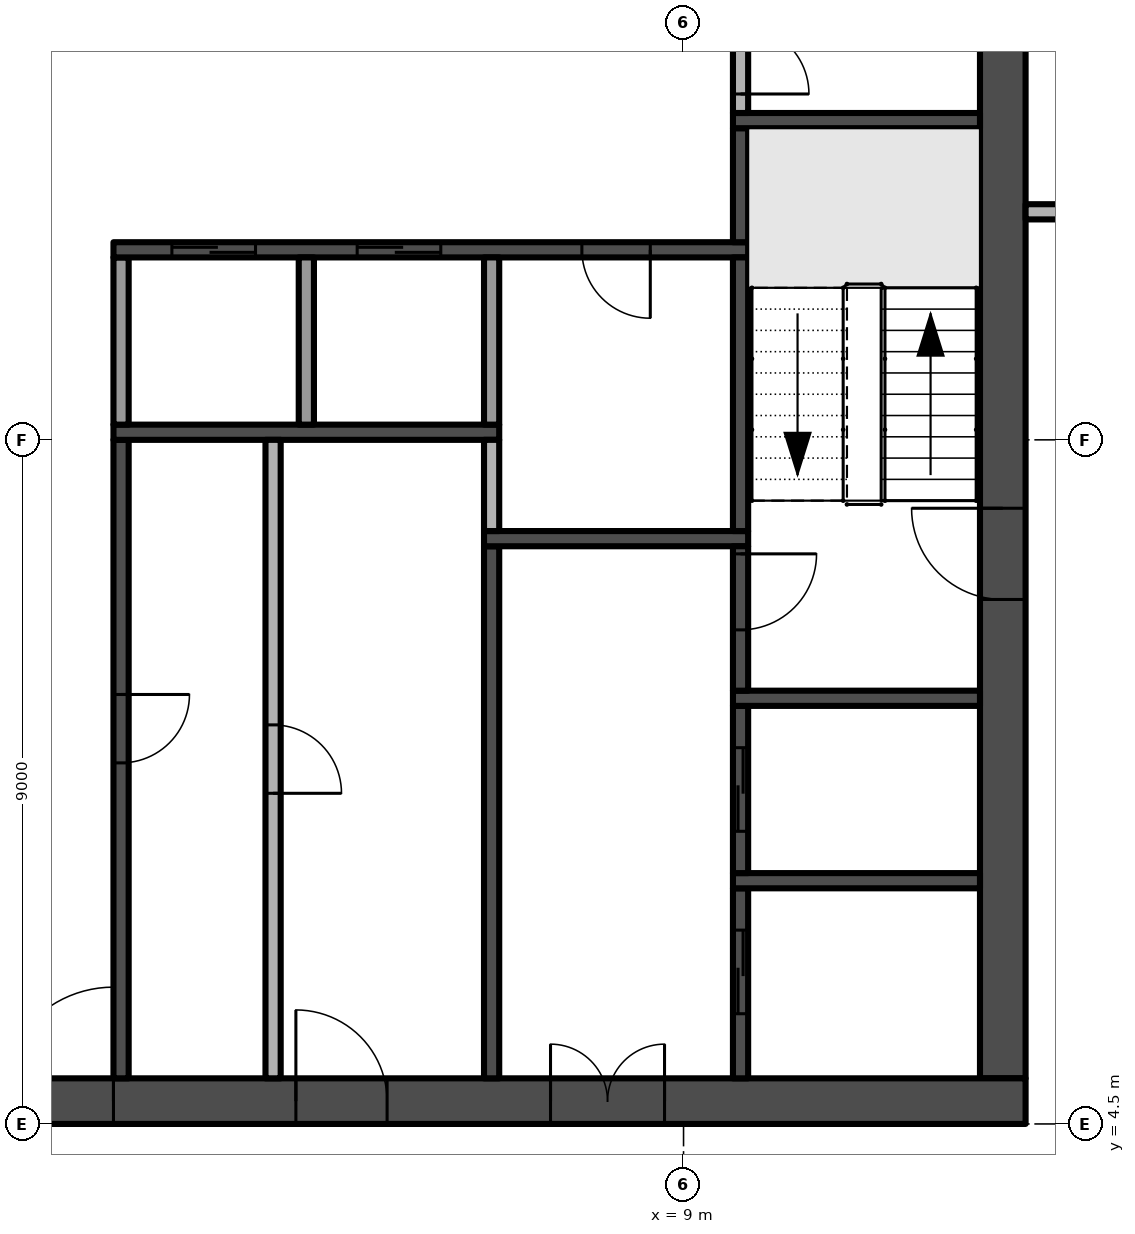
"""IFC4 building model, lengths in metres.
Left out: names, types, materials, properties, quantities, classifications, styles, units other than length and angle.
Written with IfcOpenShell. Run it as: python <this file> out.ifc"""

import sys

from ifc_helpers import new_model, si_unit, direction, frame, frame_2d, origin, place, context, subcontext, project, spatial, rectangle, extrude, element, fill, save


model = new_model("IFC4")
c1 = context("Model", 3, precision=1e-05, world=origin(), true_north=direction((0.0, 1.0)))
c2 = subcontext(c1, "Body", "Model", "MODEL_VIEW")
j1 = project(units=[si_unit("LENGTHUNIT", "METRE"), si_unit("PLANEANGLEUNIT", "RADIAN")], contexts=[c1])
p1 = place(None, origin())
s1 = spatial("IfcSite", under=j1, at=p1, CompositionType="ELEMENT")
p2 = place(p1, origin())
s2 = spatial("IfcBuilding", under=s1, at=p2, CompositionType="ELEMENT")
p3 = place(p2, frame((0.0, 0.0, 265.4)))
s3 = spatial("IfcBuildingStorey", under=s2, at=p3, CompositionType="ELEMENT", Elevation=265.4)
p4 = place(p3, frame((-13.5, 4.8, -0.3), z_axis=(0.0, 0.0, 1.0), x_axis=(1.0, 0.0, 0.0)))
e1 = element("IfcWall", 1, at=p4, inside=s3, PredefinedType="SHEAR", context=c2, shape_type="SweptSolid", body=[
    extrude(rectangle(XDim=27.0, YDim=0.6, at=frame_2d((13.5, 0.0))), origin(), (0.0, 0.0, 1.0), 3.8),
])
p5 = place(p4, frame((12.0, 0.0, 0.3)))
e2 = element("IfcOpeningElement", 2, at=p5, cuts=e1, PredefinedType="OPENING", context=c2, shape_type="SweptSolid", body=[
    extrude(rectangle(XDim=3.0, YDim=2.4, at=frame_2d((1.5, 1.2))), frame((0.0, 0.31, 0.0), z_axis=(0.0, -1.0, 0.0), x_axis=(1.0, 0.0, 0.0)), (0.0, 0.0, 1.0), 0.62),
])
p6 = place(p4, frame((4.9, 0.0, 0.3)))
e3 = element("IfcOpeningElement", 3, at=p6, cuts=e1, PredefinedType="OPENING", context=c2, shape_type="SweptSolid", body=[
    extrude(rectangle(XDim=1.2, YDim=2.2, at=frame_2d((0.6, 1.1))), frame((0.0, 0.31, 0.0), z_axis=(0.0, -1.0, 0.0), x_axis=(1.0, 0.0, 0.0)), (0.0, 0.0, 1.0), 0.62),
])
p7 = place(p4, frame((20.75, 0.0, 0.3)))
e4 = element("IfcOpeningElement", 4, at=p7, cuts=e1, PredefinedType="OPENING", context=c2, shape_type="SweptSolid", body=[
    extrude(rectangle(XDim=1.5, YDim=2.2, at=frame_2d((0.75, 1.1))), frame((0.0, 0.31, 0.0), z_axis=(0.0, -1.0, 0.0), x_axis=(1.0, 0.0, 0.0)), (0.0, 0.0, 1.0), 0.62),
])
p8 = place(p4, frame((17.4, 0.0, 0.3)))
e5 = element("IfcOpeningElement", 5, at=p8, cuts=e1, PredefinedType="OPENING", context=c2, shape_type="SweptSolid", body=[
    extrude(rectangle(XDim=1.2, YDim=2.2, at=frame_2d((0.6, 1.1))), frame((0.0, 0.31, 0.0), z_axis=(0.0, -1.0, 0.0), x_axis=(1.0, 0.0, 0.0)), (0.0, 0.0, 1.0), 0.62),
])
p9 = place(p3, frame((13.2, 5.1, -0.3), z_axis=(0.0, 0.0, 1.0), x_axis=(0.0, 1.0, 0.0)))
e6 = element("IfcWall", 6, at=p9, inside=s3, PredefinedType="SHEAR", context=c2, shape_type="SweptSolid", body=[
    extrude(rectangle(XDim=16.8, YDim=0.6, at=frame_2d((8.4, 0.0))), origin(), (0.0, 0.0, 1.0), 3.8),
])
p10 = place(p9, frame((6.3, 0.0, 0.3)))
e7 = element("IfcOpeningElement", 7, at=p10, cuts=e6, PredefinedType="OPENING", context=c2, shape_type="SweptSolid", body=[
    extrude(rectangle(XDim=1.2, YDim=2.2, at=frame_2d((0.6, 1.1))), frame((0.0, 0.31, 0.0), z_axis=(0.0, -1.0, 0.0), x_axis=(1.0, 0.0, 0.0)), (0.0, 0.0, 1.0), 0.62),
])
p11 = place(p3, frame((1.6, 13.5, 0.0), z_axis=(0.0, 0.0, 1.0), x_axis=(0.0, -1.0, 0.0)))
e8 = element("IfcWall", 8, at=p11, inside=s3, PredefinedType="SHEAR", context=c2, shape_type="SweptSolid", body=[
    extrude(rectangle(XDim=8.4, YDim=0.2, at=frame_2d((4.2, 0.0))), origin(), (0.0, 0.0, 1.0), 3.5),
])
p12 = place(p11, frame((3.35, 0.0, 0.0)))
e9 = element("IfcOpeningElement", 9, at=p12, cuts=e8, PredefinedType="OPENING", context=c2, shape_type="SweptSolid", body=[
    extrude(rectangle(XDim=0.9, YDim=2.1, at=frame_2d((0.45, 1.05))), frame((0.0, 0.11, 0.0), z_axis=(0.0, -1.0, 0.0), x_axis=(1.0, 0.0, 0.0)), (0.0, 0.0, 1.0), 0.22),
])
p13 = place(p3, frame((1.5, 13.6, 0.0), z_axis=(0.0, 0.0, 1.0), x_axis=(1.0, 0.0, 0.0)))
e10 = element("IfcWall", 10, at=p13, inside=s3, PredefinedType="SHEAR", context=c2, shape_type="SweptSolid", body=[
    extrude(rectangle(XDim=5.075, YDim=0.2, at=frame_2d((2.538, 0.0))), origin(), (0.0, 0.0, 1.0), 3.5),
])
p14 = place(p3, frame((1.6, 13.7, 0.0), z_axis=(0.0, 0.0, 1.0), x_axis=(0.0, 1.0, 0.0)))
e11 = element("IfcWall", 11, at=p14, inside=s3, PredefinedType="PARTITIONING", context=c2, shape_type="SweptSolid", body=[
    extrude(rectangle(XDim=2.2, YDim=0.2, at=frame_2d((1.1, 0.0))), origin(), (0.0, 0.0, 1.0), 3.5),
])
p15 = place(p3, frame((9.85, 16.0, 0.0), z_axis=(0.0, 0.0, 1.0), x_axis=(-1.0, 0.0, 0.0)))
e12 = element("IfcWall", 12, at=p15, inside=s3, PredefinedType="SHEAR", context=c2, shape_type="SweptSolid", body=[
    extrude(rectangle(XDim=8.35, YDim=0.2, at=frame_2d((4.175, 0.0))), origin(), (0.0, 0.0, 1.0), 3.5),
])
p16 = place(p15, frame((6.481, 0.0, 0.0)))
e13 = element("IfcOpeningElement", 13, at=p16, cuts=e12, PredefinedType="OPENING", context=c2, shape_type="SweptSolid", body=[
    extrude(rectangle(XDim=1.1, YDim=2.1, at=frame_2d((0.55, 1.05))), frame((0.0, 0.11, 0.0), z_axis=(0.0, -1.0, 0.0), x_axis=(1.0, 0.0, 0.0)), (0.0, 0.0, 1.0), 0.22),
])
p17 = place(p15, frame((4.044, 0.0, 0.0)))
e14 = element("IfcOpeningElement", 14, at=p17, cuts=e12, PredefinedType="OPENING", context=c2, shape_type="SweptSolid", body=[
    extrude(rectangle(XDim=1.1, YDim=2.1, at=frame_2d((0.55, 1.05))), frame((0.0, 0.11, 0.0), z_axis=(0.0, -1.0, 0.0), x_axis=(1.0, 0.0, 0.0)), (0.0, 0.0, 1.0), 0.22),
])
p18 = place(p15, frame((1.288, 0.0, 0.0)))
e15 = element("IfcOpeningElement", 15, at=p18, cuts=e12, PredefinedType="OPENING", context=c2, shape_type="SweptSolid", body=[
    extrude(rectangle(XDim=0.9, YDim=2.1, at=frame_2d((0.45, 1.05))), frame((0.0, 0.11, 0.0), z_axis=(0.0, -1.0, 0.0), x_axis=(1.0, 0.0, 0.0)), (0.0, 0.0, 1.0), 0.22),
])
p19 = place(p3, frame((3.6, 13.5, 0.0), z_axis=(0.0, 0.0, 1.0), x_axis=(0.0, -1.0, 0.0)))
e16 = element("IfcWall", 16, at=p19, inside=s3, PredefinedType="PARTITIONING", context=c2, shape_type="SweptSolid", body=[
    extrude(rectangle(XDim=8.4, YDim=0.2, at=frame_2d((4.2, 0.0))), origin(), (0.0, 0.0, 1.0), 3.5),
])
p20 = place(p19, frame((3.75, 0.0, 0.0)))
e17 = element("IfcOpeningElement", 17, at=p20, cuts=e16, PredefinedType="OPENING", context=c2, shape_type="SweptSolid", body=[
    extrude(rectangle(XDim=0.9, YDim=2.1, at=frame_2d((0.45, 1.05))), frame((0.0, 0.11, 0.0), z_axis=(0.0, -1.0, 0.0), x_axis=(1.0, 0.0, 0.0)), (0.0, 0.0, 1.0), 0.22),
])
p21 = place(p3, frame((4.037, 13.7, 0.0), z_axis=(0.0, 0.0, 1.0), x_axis=(0.0, 1.0, 0.0)))
e18 = element("IfcWall", 18, at=p21, inside=s3, PredefinedType="PARTITIONING", context=c2, shape_type="SweptSolid", body=[
    extrude(rectangle(XDim=2.2, YDim=0.2, at=frame_2d((1.1, 0.0))), origin(), (0.0, 0.0, 1.0), 3.5),
])
p22 = place(p3, frame((6.475, 5.1, 0.0), z_axis=(0.0, 0.0, 1.0), x_axis=(0.0, 1.0, 0.0)))
e19 = element("IfcWall", 19, at=p22, inside=s3, PredefinedType="SHEAR", context=c2, shape_type="SweptSolid", body=[
    extrude(rectangle(XDim=7.0, YDim=0.2, at=frame_2d((3.5, 0.0))), origin(), (0.0, 0.0, 1.0), 3.5),
])
p23 = place(p3, frame((6.375, 12.2, 0.0), z_axis=(0.0, 0.0, 1.0), x_axis=(1.0, 0.0, 0.0)))
e20 = element("IfcWall", 20, at=p23, inside=s3, PredefinedType="SHEAR", context=c2, shape_type="SweptSolid", body=[
    extrude(rectangle(XDim=3.475, YDim=0.2, at=frame_2d((1.738, 0.0))), origin(), (0.0, 0.0, 1.0), 3.5),
])
p24 = place(p3, frame((6.475, 12.3, 0.0), z_axis=(0.0, 0.0, 1.0), x_axis=(0.0, 1.0, 0.0)))
e21 = element("IfcWall", 21, at=p24, inside=s3, PredefinedType="PARTITIONING", context=c2, shape_type="SweptSolid", body=[
    extrude(rectangle(XDim=1.2, YDim=0.2, at=frame_2d((0.6, 0.0))), origin(), (0.0, 0.0, 1.0), 3.5),
])
p25 = place(p3, frame((6.475, 13.7, 0.0), z_axis=(0.0, 0.0, 1.0), x_axis=(0.0, 1.0, 0.0)))
e22 = element("IfcWall", 22, at=p25, inside=s3, PredefinedType="PARTITIONING", context=c2, shape_type="SweptSolid", body=[
    extrude(rectangle(XDim=2.2, YDim=0.2, at=frame_2d((1.1, 0.0))), origin(), (0.0, 0.0, 1.0), 3.5),
])
p26 = place(p3, frame((9.75, 5.1, 0.0), z_axis=(0.0, 0.0, 1.0), x_axis=(0.0, 1.0, 0.0)))
e23 = element("IfcWall", 23, at=p26, inside=s3, PredefinedType="SHEAR", context=c2, shape_type="SweptSolid", body=[
    extrude(rectangle(XDim=2.5, YDim=0.2, at=frame_2d((1.25, 0.0))), origin(), (0.0, 0.0, 1.0), 3.5),
])
p27 = place(p26, frame((0.85, 0.0, 0.0)))
e24 = element("IfcOpeningElement", 24, at=p27, cuts=e23, PredefinedType="OPENING", context=c2, shape_type="SweptSolid", body=[
    extrude(rectangle(XDim=1.1, YDim=2.1, at=frame_2d((0.55, 1.05))), frame((0.0, 0.11, 0.0), z_axis=(0.0, -1.0, 0.0), x_axis=(1.0, 0.0, 0.0)), (0.0, 0.0, 1.0), 0.22),
])
p28 = place(p3, frame((9.65, 7.7, 0.0), z_axis=(0.0, 0.0, 1.0), x_axis=(1.0, 0.0, 0.0)))
e25 = element("IfcWall", 25, at=p28, inside=s3, PredefinedType="SHEAR", context=c2, shape_type="SweptSolid", body=[
    extrude(rectangle(XDim=3.25, YDim=0.2, at=frame_2d((1.625, 0.0))), origin(), (0.0, 0.0, 1.0), 3.5),
])
p29 = place(p3, frame((9.75, 7.8, 0.0), z_axis=(0.0, 0.0, 1.0), x_axis=(0.0, 1.0, 0.0)))
e26 = element("IfcWall", 26, at=p29, inside=s3, PredefinedType="SHEAR", context=c2, shape_type="SweptSolid", body=[
    extrude(rectangle(XDim=2.2, YDim=0.2, at=frame_2d((1.1, 0.0))), origin(), (0.0, 0.0, 1.0), 3.5),
])
p30 = place(p29, frame((0.55, 0.0, 0.0)))
e27 = element("IfcOpeningElement", 27, at=p30, cuts=e26, PredefinedType="OPENING", context=c2, shape_type="SweptSolid", body=[
    extrude(rectangle(XDim=1.1, YDim=2.1, at=frame_2d((0.55, 1.05))), frame((0.0, 0.11, 0.0), z_axis=(0.0, -1.0, 0.0), x_axis=(1.0, 0.0, 0.0)), (0.0, 0.0, 1.0), 0.22),
])
p31 = place(p3, frame((9.65, 10.1, 0.0), z_axis=(0.0, 0.0, 1.0), x_axis=(1.0, 0.0, 0.0)))
e28 = element("IfcWall", 28, at=p31, inside=s3, PredefinedType="SHEAR", context=c2, shape_type="SweptSolid", body=[
    extrude(rectangle(XDim=3.25, YDim=0.2, at=frame_2d((1.625, 0.0))), origin(), (0.0, 0.0, 1.0), 3.5),
])
p32 = place(p3, frame((9.75, 12.1, 0.0), z_axis=(0.0, 0.0, 1.0), x_axis=(0.0, -1.0, 0.0)))
e29 = element("IfcWall", 29, at=p32, inside=s3, PredefinedType="SHEAR", context=c2, shape_type="SweptSolid", body=[
    extrude(rectangle(XDim=1.9, YDim=0.2, at=frame_2d((0.95, 0.0))), origin(), (0.0, 0.0, 1.0), 3.5),
])
p33 = place(p32, frame((0.1, 0.0, 0.0)))
e30 = element("IfcOpeningElement", 30, at=p33, cuts=e29, PredefinedType="OPENING", context=c2, shape_type="SweptSolid", body=[
    extrude(rectangle(XDim=1.0, YDim=2.2, at=frame_2d((0.5, 1.1))), frame((0.0, 0.11, 0.0), z_axis=(0.0, -1.0, 0.0), x_axis=(1.0, 0.0, 0.0)), (0.0, 0.0, 1.0), 0.22),
])
p34 = place(p3, frame((9.75, 12.3, 0.0), z_axis=(0.0, 0.0, 1.0), x_axis=(0.0, 1.0, 0.0)))
e31 = element("IfcWall", 31, at=p34, inside=s3, PredefinedType="SHEAR", context=c2, shape_type="SweptSolid", body=[
    extrude(rectangle(XDim=3.6, YDim=0.2, at=frame_2d((1.8, 0.0))), origin(), (0.0, 0.0, 1.0), 3.5),
])
p35 = place(p3, frame((9.75, 16.1, 0.0), z_axis=(0.0, 0.0, 1.0), x_axis=(0.0, 1.0, 0.0)))
e32 = element("IfcWall", 32, at=p35, inside=s3, PredefinedType="SHEAR", context=c2, shape_type="SweptSolid", body=[
    extrude(rectangle(XDim=1.5, YDim=0.2, at=frame_2d((0.75, 0.0))), origin(), (0.0, 0.0, 1.0), 3.5),
])
p36 = place(p3, frame((9.65, 17.7, 0.0), z_axis=(0.0, 0.0, 1.0), x_axis=(1.0, 0.0, 0.0)))
e33 = element("IfcWall", 33, at=p36, inside=s3, PredefinedType="SHEAR", context=c2, shape_type="SweptSolid", body=[
    extrude(rectangle(XDim=3.25, YDim=0.2, at=frame_2d((1.625, 0.0))), origin(), (0.0, 0.0, 1.0), 3.5),
])
p37 = place(p3, frame((9.75, 19.2, 0.0), z_axis=(0.0, 0.0, 1.0), x_axis=(0.0, -1.0, 0.0)))
e34 = element("IfcWall", 34, at=p37, inside=s3, PredefinedType="PARTITIONING", context=c2, shape_type="SweptSolid", body=[
    extrude(rectangle(XDim=1.4, YDim=0.2, at=frame_2d((0.7, 0.0))), origin(), (0.0, 0.0, 1.0), 3.5),
])
p38 = place(p37, frame((0.25, 0.0, 0.0)))
e35 = element("IfcOpeningElement", 35, at=p38, cuts=e34, PredefinedType="OPENING", context=c2, shape_type="SweptSolid", body=[
    extrude(rectangle(XDim=0.9, YDim=2.1, at=frame_2d((0.45, 1.05))), frame((0.0, 0.11, 0.0), z_axis=(0.0, -1.0, 0.0), x_axis=(1.0, 0.0, 0.0)), (0.0, 0.0, 1.0), 0.22),
])
p39 = place(p3, frame((13.5, 16.5, 0.0), z_axis=(0.0, 0.0, 1.0), x_axis=(1.0, 0.0, 0.0)))
e36 = element("IfcWall", 36, at=p39, inside=s3, PredefinedType="PARTITIONING", context=c2, shape_type="SweptSolid", body=[
    extrude(rectangle(XDim=3.825, YDim=0.2, at=frame_2d((1.913, 0.0))), origin(), (0.0, 0.0, 1.0), 3.5),
])
p40 = place(p39, frame((1.55, 0.0, 0.0)))
e37 = element("IfcOpeningElement", 37, at=p40, cuts=e36, PredefinedType="OPENING", context=c2, shape_type="SweptSolid", body=[
    extrude(rectangle(XDim=0.9, YDim=2.1, at=frame_2d((0.45, 1.05))), frame((0.0, 0.11, 0.0), z_axis=(0.0, -1.0, 0.0), x_axis=(1.0, 0.0, 0.0)), (0.0, 0.0, 1.0), 0.22),
])
p41 = place(p5, frame((3.0, 0.0, 0.0), z_axis=(0.0, 0.0, 1.0), x_axis=(-1.0, 0.0, 0.0)))
e38 = element("IfcDoor", 38, at=p41, inside=s3, OperationType="DOUBLE_DOOR_SINGLE_SWING", PredefinedType="DOOR", context=c2, shape_type="SweptSolid", body=[
    extrude(rectangle(XDim=3.0, YDim=2.4, at=frame_2d((1.5, 1.2))), frame((0.0, 0.025, 0.0), z_axis=(0.0, -1.0, 0.0), x_axis=(1.0, 0.0, 0.0)), (0.0, 0.0, 1.0), 0.05),
])
fill(e2, e38)
p42 = place(p10, frame((1.2, 0.0, 0.0), z_axis=(0.0, 0.0, 1.0), x_axis=(-1.0, 0.0, 0.0)))
e39 = element("IfcDoor", 39, at=p42, inside=s3, OperationType="SINGLE_SWING_LEFT", PredefinedType="DOOR", context=c2, shape_type="SweptSolid", body=[
    extrude(rectangle(XDim=1.2, YDim=2.2, at=frame_2d((0.6, 1.1))), frame((0.0, 0.025, 0.0), z_axis=(0.0, -1.0, 0.0), x_axis=(1.0, 0.0, 0.0)), (0.0, 0.0, 1.0), 0.05),
])
fill(e7, e39)
p43 = place(p7, frame((1.5, 0.0, 0.0), z_axis=(0.0, 0.0, 1.0), x_axis=(-1.0, 0.0, 0.0)))
e40 = element("IfcDoor", 40, at=p43, inside=s3, OperationType="DOUBLE_DOOR_SINGLE_SWING", PredefinedType="DOOR", context=c2, shape_type="SweptSolid", body=[
    extrude(rectangle(XDim=1.5, YDim=2.2, at=frame_2d((0.75, 1.1))), frame((0.0, 0.025, 0.0), z_axis=(0.0, -1.0, 0.0), x_axis=(1.0, 0.0, 0.0)), (0.0, 0.0, 1.0), 0.05),
])
fill(e4, e40)
p44 = place(p8, frame((1.2, 0.0, 0.0), z_axis=(0.0, 0.0, 1.0), x_axis=(-1.0, 0.0, 0.0)))
e41 = element("IfcDoor", 41, at=p44, inside=s3, OperationType="SINGLE_SWING_RIGHT", PredefinedType="DOOR", context=c2, shape_type="SweptSolid", body=[
    extrude(rectangle(XDim=1.2, YDim=2.2, at=frame_2d((0.6, 1.1))), frame((0.0, 0.025, 0.0), z_axis=(0.0, -1.0, 0.0), x_axis=(1.0, 0.0, 0.0)), (0.0, 0.0, 1.0), 0.05),
])
fill(e5, e41)
p45 = place(p33, origin())
e42 = element("IfcDoor", 42, at=p45, inside=s3, OperationType="SINGLE_SWING_LEFT", PredefinedType="DOOR", context=c2, shape_type="SweptSolid", body=[
    extrude(rectangle(XDim=1.0, YDim=2.2, at=frame_2d((0.5, 1.1))), frame((0.0, 0.025, 0.0), z_axis=(0.0, -1.0, 0.0), x_axis=(1.0, 0.0, 0.0)), (0.0, 0.0, 1.0), 0.05),
])
fill(e30, e42)
p46 = place(p16, origin())
e43 = element("IfcDoor", 43, at=p46, inside=s3, OperationType="SLIDING_TO_RIGHT", PredefinedType="DOOR", context=c2, shape_type="SweptSolid", body=[
    extrude(rectangle(XDim=1.1, YDim=2.1, at=frame_2d((0.55, 1.05))), frame((0.0, 0.025, 0.0), z_axis=(0.0, -1.0, 0.0), x_axis=(1.0, 0.0, 0.0)), (0.0, 0.0, 1.0), 0.05),
])
fill(e13, e43)
p47 = place(p17, origin())
e44 = element("IfcDoor", 44, at=p47, inside=s3, OperationType="SLIDING_TO_RIGHT", PredefinedType="DOOR", context=c2, shape_type="SweptSolid", body=[
    extrude(rectangle(XDim=1.1, YDim=2.1, at=frame_2d((0.55, 1.05))), frame((0.0, 0.025, 0.0), z_axis=(0.0, -1.0, 0.0), x_axis=(1.0, 0.0, 0.0)), (0.0, 0.0, 1.0), 0.05),
])
fill(e14, e44)
p48 = place(p27, origin())
e45 = element("IfcDoor", 45, at=p48, inside=s3, OperationType="SLIDING_TO_RIGHT", PredefinedType="DOOR", context=c2, shape_type="SweptSolid", body=[
    extrude(rectangle(XDim=1.1, YDim=2.1, at=frame_2d((0.55, 1.05))), frame((0.0, 0.025, 0.0), z_axis=(0.0, -1.0, 0.0), x_axis=(1.0, 0.0, 0.0)), (0.0, 0.0, 1.0), 0.05),
])
fill(e24, e45)
p49 = place(p30, origin())
e46 = element("IfcDoor", 46, at=p49, inside=s3, OperationType="SLIDING_TO_RIGHT", PredefinedType="DOOR", context=c2, shape_type="SweptSolid", body=[
    extrude(rectangle(XDim=1.1, YDim=2.1, at=frame_2d((0.55, 1.05))), frame((0.0, 0.025, 0.0), z_axis=(0.0, -1.0, 0.0), x_axis=(1.0, 0.0, 0.0)), (0.0, 0.0, 1.0), 0.05),
])
fill(e27, e46)
p50 = place(p12, origin())
e47 = element("IfcDoor", 47, at=p50, inside=s3, OperationType="SINGLE_SWING_LEFT", PredefinedType="DOOR", context=c2, shape_type="SweptSolid", body=[
    extrude(rectangle(XDim=0.9, YDim=2.1, at=frame_2d((0.45, 1.05))), frame((0.0, 0.025, 0.0), z_axis=(0.0, -1.0, 0.0), x_axis=(1.0, 0.0, 0.0)), (0.0, 0.0, 1.0), 0.05),
])
fill(e9, e47)
p51 = place(p18, origin())
e48 = element("IfcDoor", 48, at=p51, inside=s3, OperationType="SINGLE_SWING_LEFT", PredefinedType="DOOR", context=c2, shape_type="SweptSolid", body=[
    extrude(rectangle(XDim=0.9, YDim=2.1, at=frame_2d((0.45, 1.05))), frame((0.0, 0.025, 0.0), z_axis=(0.0, -1.0, 0.0), x_axis=(1.0, 0.0, 0.0)), (0.0, 0.0, 1.0), 0.05),
])
fill(e15, e48)
p52 = place(p38, origin())
e49 = element("IfcDoor", 49, at=p52, inside=s3, OperationType="SINGLE_SWING_RIGHT", PredefinedType="DOOR", context=c2, shape_type="SweptSolid", body=[
    extrude(rectangle(XDim=0.9, YDim=2.1, at=frame_2d((0.45, 1.05))), frame((0.0, 0.025, 0.0), z_axis=(0.0, -1.0, 0.0), x_axis=(1.0, 0.0, 0.0)), (0.0, 0.0, 1.0), 0.05),
])
fill(e35, e49)
p53 = place(p20, origin())
e50 = element("IfcDoor", 50, at=p53, inside=s3, OperationType="SINGLE_SWING_RIGHT", PredefinedType="DOOR", context=c2, shape_type="SweptSolid", body=[
    extrude(rectangle(XDim=0.9, YDim=2.1, at=frame_2d((0.45, 1.05))), frame((0.0, 0.025, 0.0), z_axis=(0.0, -1.0, 0.0), x_axis=(1.0, 0.0, 0.0)), (0.0, 0.0, 1.0), 0.05),
])
fill(e17, e50)
save(model, sys.argv[1])
